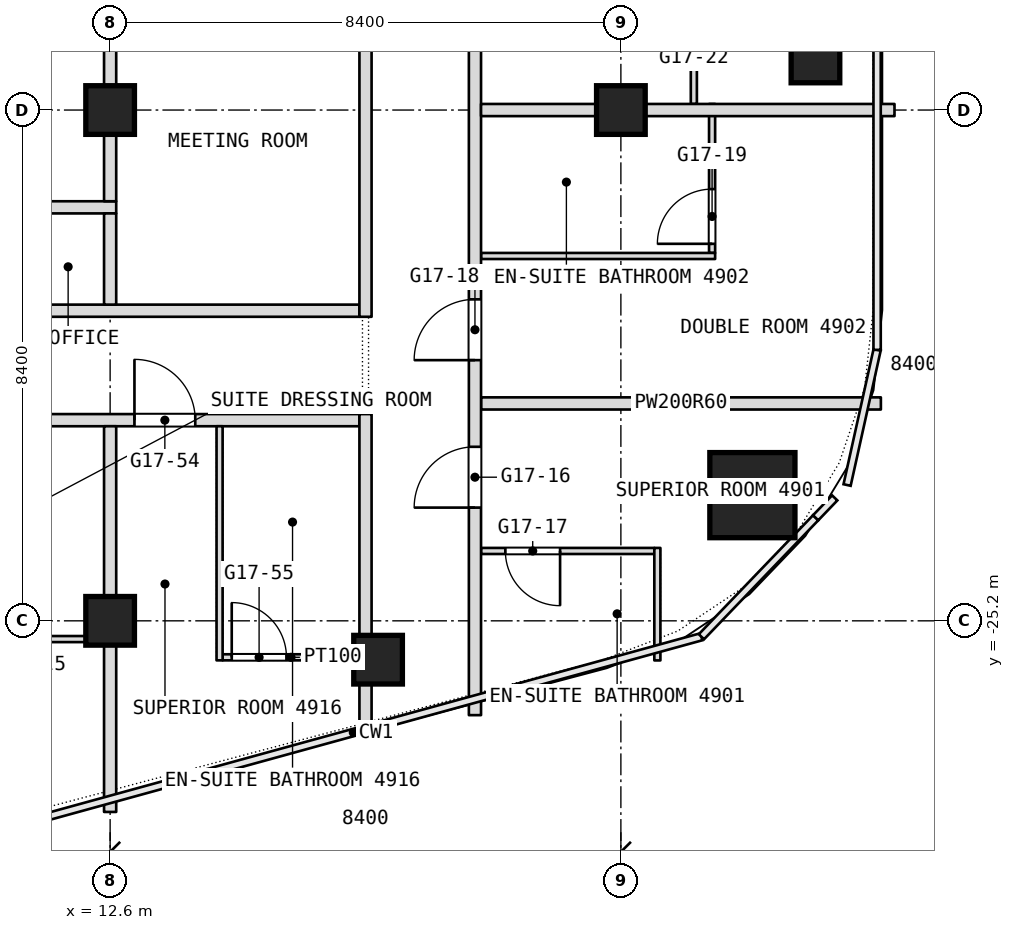
"""IFC4 building model, lengths in metres.
Left out: names, types, materials, properties, quantities, classifications, styles, units other than length and angle.
Written with IfcOpenShell. Run it as: python <this file> out.ifc"""

import sys

from ifc_helpers import new_model, si_unit, direction, frame, frame_2d, origin, origin_2d, place, context, subcontext, project, spatial, rectangle, extrude, element, fill, save


model = new_model("IFC4")
c1 = context("Model", 3, precision=1e-05, world=origin(), true_north=direction((0.0, 1.0)))
c2 = subcontext(c1, "Body", "Model", "MODEL_VIEW")
j1 = project(units=[si_unit("LENGTHUNIT", "METRE"), si_unit("PLANEANGLEUNIT", "RADIAN")], contexts=[c1])
p1 = place(None, origin())
s1 = spatial("IfcSite", under=j1, at=p1, CompositionType="ELEMENT")
p2 = place(p1, origin())
s2 = spatial("IfcBuilding", under=s1, at=p2, CompositionType="ELEMENT")
p3 = place(p2, frame((0.0, 0.0, 212.9)))
s3 = spatial("IfcBuildingStorey", under=s2, at=p3, CompositionType="ELEMENT", Elevation=212.9)
p4 = place(p3, frame((23.163, -23.133, 0.0), z_axis=(0.0, 0.0, 1.0), x_axis=(1.0, 0.0, 0.0)))
e1 = element("IfcColumn", 1, at=p4, inside=s3, PredefinedType="COLUMN", context=c2, shape_type="SweptSolid", body=[
    extrude(rectangle(XDim=1.4, YDim=1.4, at=origin_2d()), origin(), (0.0, 0.0, 1.0), 3.6),
])
for number, where, z_axis, x_axis in (
    (2, (12.6, -25.2, 0.0), (0.0, 0.0, 1.0), (1.0, 0.0, 0.0)),
    (3, (12.6, -16.8, 0.0), (0.0, 0.0, 1.0), (1.0, 0.0, 0.0)),
    (4, (21.0, -16.8, 0.0), (0.0, 0.0, 1.0), (1.0, 0.0, 0.0)),
    (5, (24.2, -15.952, 0.0), (0.0, 0.0, 1.0), (1.0, 0.0, 0.0)),
    (6, (17.007, -25.839, 0.0), (0.0, 0.0, 1.0), (1.0, 0.0, 0.0)),
):
    element("IfcColumn", number, at=place(p3, frame(where, z_axis=z_axis, x_axis=x_axis)), inside=s3, PredefinedType="COLUMN", context=c2, shape_type="SweptSolid", body=[
        extrude(rectangle(XDim=0.8, YDim=0.8, at=origin_2d()), origin(), (0.0, 0.0, 1.0), 3.6),
    ])
p5 = place(p3, frame((14.45, -25.8, 0.0), z_axis=(0.0, 0.0, 1.0), x_axis=(1.0, 0.0, 0.0)))
e7 = element("IfcWall", 7, at=p5, inside=s3, PredefinedType="PARTITIONING", context=c2, shape_type="SweptSolid", body=[
    extrude(rectangle(XDim=2.25, YDim=0.1, at=frame_2d((1.125, 0.0))), origin(), (0.0, 0.0, 1.0), 3.34),
])
p6 = place(p5, frame((0.15, 0.0, 0.0)))
e8 = element("IfcOpeningElement", 8, at=p6, cuts=e7, PredefinedType="OPENING", context=c2, shape_type="SweptSolid", body=[
    extrude(rectangle(XDim=0.9, YDim=2.1, at=frame_2d((0.45, 1.05))), frame((0.0, 0.05, 0.0), z_axis=(0.0, -1.0, 0.0), x_axis=(1.0, 0.0, 0.0)), (0.0, 0.0, 1.0), 0.1),
])
p7 = place(p3, frame((10.25, -25.5, 0.0), z_axis=(0.0, 0.0, 1.0), x_axis=(1.0, 0.0, 0.0)))
e9 = element("IfcWall", 9, at=p7, inside=s3, PredefinedType="PARTITIONING", context=c2, shape_type="SweptSolid", body=[
    extrude(rectangle(XDim=2.45, YDim=0.1, at=frame_2d((1.225, 0.0))), origin(), (0.0, 0.0, 1.0), 3.34),
])
p8 = place(p7, frame((0.15, 0.0, 0.0)))
e10 = element("IfcOpeningElement", 10, at=p8, cuts=e9, PredefinedType="OPENING", context=c2, shape_type="SweptSolid", body=[
    extrude(rectangle(XDim=0.9, YDim=2.1, at=frame_2d((0.45, 1.05))), frame((0.0, 0.05, 0.0), z_axis=(0.0, -1.0, 0.0), x_axis=(1.0, 0.0, 0.0)), (0.0, 0.0, 1.0), 0.1),
])
p9 = place(p3, frame((18.7, -24.051, 0.0), z_axis=(0.0, 0.0, 1.0), x_axis=(1.0, 0.0, 0.0)))
e11 = element("IfcWall", 11, at=p9, inside=s3, PredefinedType="PARTITIONING", context=c2, shape_type="SweptSolid", body=[
    extrude(rectangle(XDim=2.85, YDim=0.1, at=frame_2d((1.425, 0.0))), origin(), (0.0, 0.0, 1.0), 3.34),
])
p10 = place(p9, frame((0.4, 0.0, 0.0)))
e12 = element("IfcOpeningElement", 12, at=p10, cuts=e11, PredefinedType="OPENING", context=c2, shape_type="SweptSolid", body=[
    extrude(rectangle(XDim=0.9, YDim=2.1, at=frame_2d((0.45, 1.05))), frame((0.0, 0.05, 0.0), z_axis=(0.0, -1.0, 0.0), x_axis=(1.0, 0.0, 0.0)), (0.0, 0.0, 1.0), 0.1),
])
p11 = place(p3, frame((22.5, -19.15, 0.0), z_axis=(0.0, 0.0, 1.0), x_axis=(0.0, 1.0, 0.0)))
e13 = element("IfcWall", 13, at=p11, inside=s3, PredefinedType="PARTITIONING", context=c2, shape_type="SweptSolid", body=[
    extrude(rectangle(XDim=2.45, YDim=0.1, at=frame_2d((1.225, 0.0))), origin(), (0.0, 0.0, 1.0), 3.34),
])
p12 = place(p11, frame((0.15, 0.0, 0.0)))
e14 = element("IfcOpeningElement", 14, at=p12, cuts=e13, PredefinedType="OPENING", context=c2, shape_type="SweptSolid", body=[
    extrude(rectangle(XDim=0.9, YDim=2.1, at=frame_2d((0.45, 1.05))), frame((0.0, 0.05, 0.0), z_axis=(0.0, -1.0, 0.0), x_axis=(1.0, 0.0, 0.0)), (0.0, 0.0, 1.0), 0.1),
])
p13 = place(p3, frame((22.2, -16.7, 0.0), z_axis=(0.0, 0.0, 1.0), x_axis=(0.0, 1.0, 0.0)))
e15 = element("IfcWall", 15, at=p13, inside=s3, PredefinedType="PARTITIONING", context=c2, shape_type="SweptSolid", body=[
    extrude(rectangle(XDim=2.35, YDim=0.1, at=frame_2d((1.175, 0.0))), origin(), (0.0, 0.0, 1.0), 3.34),
])
p14 = place(p13, frame((1.3, 0.0, 0.0)))
e16 = element("IfcOpeningElement", 16, at=p14, cuts=e15, PredefinedType="OPENING", context=c2, shape_type="SweptSolid", body=[
    extrude(rectangle(XDim=0.9, YDim=2.1, at=frame_2d((0.45, 1.05))), frame((0.0, 0.05, 0.0), z_axis=(0.0, -1.0, 0.0), x_axis=(1.0, 0.0, 0.0)), (0.0, 0.0, 1.0), 0.1),
])
p15 = place(p3, frame((-16.7, -21.9, 0.0), z_axis=(0.0, 0.0, 1.0), x_axis=(1.0, 0.0, 0.0)))
e17 = element("IfcWall", 17, at=p15, inside=s3, PredefinedType="PARTITIONING", context=c2, shape_type="SweptSolid", body=[
    extrude(rectangle(XDim=33.4, YDim=0.2, at=frame_2d((16.7, 0.0))), origin(), (0.0, 0.0, 1.0), 3.34),
])
p16 = place(p15, frame((0.3, 0.0, 0.0)))
e18 = element("IfcOpeningElement", 18, at=p16, cuts=e17, PredefinedType="OPENING", context=c2, shape_type="SweptSolid", body=[
    extrude(rectangle(XDim=1.0, YDim=2.1, at=frame_2d((0.5, 1.05))), frame((0.0, 0.1, 0.0), z_axis=(0.0, -1.0, 0.0), x_axis=(1.0, 0.0, 0.0)), (0.0, 0.0, 1.0), 0.2),
])
p17 = place(p15, frame((6.9, 0.0, 0.0)))
e19 = element("IfcOpeningElement", 19, at=p17, cuts=e17, PredefinedType="OPENING", context=c2, shape_type="SweptSolid", body=[
    extrude(rectangle(XDim=1.0, YDim=2.1, at=frame_2d((0.5, 1.05))), frame((0.0, 0.1, 0.0), z_axis=(0.0, -1.0, 0.0), x_axis=(1.0, 0.0, 0.0)), (0.0, 0.0, 1.0), 0.2),
])
p18 = place(p15, frame((8.7, 0.0, 0.0)))
e20 = element("IfcOpeningElement", 20, at=p18, cuts=e17, PredefinedType="OPENING", context=c2, shape_type="SweptSolid", body=[
    extrude(rectangle(XDim=1.0, YDim=2.1, at=frame_2d((0.5, 1.05))), frame((0.0, 0.1, 0.0), z_axis=(0.0, -1.0, 0.0), x_axis=(1.0, 0.0, 0.0)), (0.0, 0.0, 1.0), 0.2),
])
p19 = place(p15, frame((12.9, 0.0, 0.0)))
e21 = element("IfcOpeningElement", 21, at=p19, cuts=e17, PredefinedType="OPENING", context=c2, shape_type="SweptSolid", body=[
    extrude(rectangle(XDim=1.0, YDim=2.1, at=frame_2d((0.5, 1.05))), frame((0.0, 0.1, 0.0), z_axis=(0.0, -1.0, 0.0), x_axis=(1.0, 0.0, 0.0)), (0.0, 0.0, 1.0), 0.2),
])
p20 = place(p15, frame((19.5, 0.0, 0.0)))
e22 = element("IfcOpeningElement", 22, at=p20, cuts=e17, PredefinedType="OPENING", context=c2, shape_type="SweptSolid", body=[
    extrude(rectangle(XDim=1.0, YDim=2.1, at=frame_2d((0.5, 1.05))), frame((0.0, 0.1, 0.0), z_axis=(0.0, -1.0, 0.0), x_axis=(1.0, 0.0, 0.0)), (0.0, 0.0, 1.0), 0.2),
])
p21 = place(p15, frame((24.6, 0.0, 0.0)))
e23 = element("IfcOpeningElement", 23, at=p21, cuts=e17, PredefinedType="OPENING", context=c2, shape_type="SweptSolid", body=[
    extrude(rectangle(XDim=1.1, YDim=2.1, at=frame_2d((0.55, 1.05))), frame((0.0, 0.1, 0.0), z_axis=(0.0, -1.0, 0.0), x_axis=(1.0, 0.0, 0.0)), (0.0, 0.0, 1.0), 0.2),
])
p22 = place(p15, frame((29.7, 0.0, 0.0)))
e24 = element("IfcOpeningElement", 24, at=p22, cuts=e17, PredefinedType="OPENING", context=c2, shape_type="SweptSolid", body=[
    extrude(rectangle(XDim=1.0, YDim=2.1, at=frame_2d((0.5, 1.05))), frame((0.0, 0.1, 0.0), z_axis=(0.0, -1.0, 0.0), x_axis=(1.0, 0.0, 0.0)), (0.0, 0.0, 1.0), 0.2),
])
p23 = place(p3, frame((18.7, -21.625, 0.0), z_axis=(0.0, 0.0, 1.0), x_axis=(1.0, 0.0, 0.0)))
e25 = element("IfcWall", 25, at=p23, inside=s3, PredefinedType="PARTITIONING", context=c2, shape_type="SweptSolid", body=[
    extrude(rectangle(XDim=6.576, YDim=0.2, at=frame_2d((3.288, 0.0))), origin(), (0.0, 0.0, 1.0), 3.34),
])
p24 = place(p3, frame((21.6, -25.851, 0.0), z_axis=(0.0, 0.0, 1.0), x_axis=(0.0, 1.0, 0.0)))
e26 = element("IfcWall", 26, at=p24, inside=s3, PredefinedType="PARTITIONING", context=c2, shape_type="SweptSolid", body=[
    extrude(rectangle(XDim=1.85, YDim=0.1, at=frame_2d((0.925, 0.0))), origin(), (0.0, 0.0, 1.0), 3.34),
])
p25 = place(p3, frame((-4.1, -20.1, 0.0), z_axis=(0.0, 0.0, 1.0), x_axis=(1.0, 0.0, 0.0)))
e27 = element("IfcWall", 27, at=p25, inside=s3, PredefinedType="PARTITIONING", context=c2, shape_type="SweptSolid", body=[
    extrude(rectangle(XDim=20.8, YDim=0.2, at=frame_2d((10.4, 0.0))), origin(), (0.0, 0.0, 1.0), 3.34),
])
p26 = place(p3, frame((18.7, -19.2, 0.0), z_axis=(0.0, 0.0, 1.0), x_axis=(1.0, 0.0, 0.0)))
e28 = element("IfcWall", 28, at=p26, inside=s3, PredefinedType="PARTITIONING", context=c2, shape_type="SweptSolid", body=[
    extrude(rectangle(XDim=3.85, YDim=0.1, at=frame_2d((1.925, 0.0))), origin(), (0.0, 0.0, 1.0), 3.34),
])
p27 = place(p3, frame((18.6, -26.751, 0.0), z_axis=(0.0, 0.0, 1.0), x_axis=(0.0, 1.0, 0.0)))
e29 = element("IfcWall", 29, at=p27, inside=s3, PredefinedType="PARTITIONING", context=c2, shape_type="SweptSolid", body=[
    extrude(rectangle(XDim=49.091, YDim=0.2, at=frame_2d((24.545, 0.0))), origin(), (0.0, 0.0, 1.0), 3.34),
])
p28 = place(p27, frame((3.413, 0.0, 0.0)))
e30 = element("IfcOpeningElement", 30, at=p28, cuts=e29, PredefinedType="OPENING", context=c2, shape_type="SweptSolid", body=[
    extrude(rectangle(XDim=1.0, YDim=2.1, at=frame_2d((0.5, 1.05))), frame((0.0, 0.1, 0.0), z_axis=(0.0, -1.0, 0.0), x_axis=(1.0, 0.0, 0.0)), (0.0, 0.0, 1.0), 0.2),
])
p29 = place(p27, frame((5.838, 0.0, 0.0)))
e31 = element("IfcOpeningElement", 31, at=p29, cuts=e29, PredefinedType="OPENING", context=c2, shape_type="SweptSolid", body=[
    extrude(rectangle(XDim=1.0, YDim=2.1, at=frame_2d((0.5, 1.05))), frame((0.0, 0.1, 0.0), z_axis=(0.0, -1.0, 0.0), x_axis=(1.0, 0.0, 0.0)), (0.0, 0.0, 1.0), 0.2),
])
p30 = place(p27, frame((13.551, 0.0, 0.0)))
e32 = element("IfcOpeningElement", 32, at=p30, cuts=e29, PredefinedType="OPENING", context=c2, shape_type="SweptSolid", body=[
    extrude(rectangle(XDim=1.1, YDim=2.1, at=frame_2d((0.55, 1.05))), frame((0.0, 0.1, 0.0), z_axis=(0.0, -1.0, 0.0), x_axis=(1.0, 0.0, 0.0)), (0.0, 0.0, 1.0), 0.2),
])
p31 = place(p27, frame((21.151, 0.0, 0.0)))
e33 = element("IfcOpeningElement", 33, at=p31, cuts=e29, PredefinedType="OPENING", context=c2, shape_type="SweptSolid", body=[
    extrude(rectangle(XDim=1.0, YDim=2.1, at=frame_2d((0.5, 1.05))), frame((0.0, 0.1, 0.0), z_axis=(0.0, -1.0, 0.0), x_axis=(1.0, 0.0, 0.0)), (0.0, 0.0, 1.0), 0.2),
])
p32 = place(p27, frame((22.951, 0.0, 0.0)))
e34 = element("IfcOpeningElement", 34, at=p32, cuts=e29, PredefinedType="OPENING", context=c2, shape_type="SweptSolid", body=[
    extrude(rectangle(XDim=1.0, YDim=2.1, at=frame_2d((0.5, 1.05))), frame((0.0, 0.1, 0.0), z_axis=(0.0, -1.0, 0.0), x_axis=(1.0, 0.0, 0.0)), (0.0, 0.0, 1.0), 0.2),
])
p33 = place(p27, frame((30.351, 0.0, 0.0)))
e35 = element("IfcOpeningElement", 35, at=p33, cuts=e29, PredefinedType="OPENING", context=c2, shape_type="SweptSolid", body=[
    extrude(rectangle(XDim=1.1, YDim=2.1, at=frame_2d((0.55, 1.05))), frame((0.0, 0.1, 0.0), z_axis=(0.0, -1.0, 0.0), x_axis=(1.0, 0.0, 0.0)), (0.0, 0.0, 1.0), 0.2),
])
p34 = place(p27, frame((37.951, 0.0, 0.0)))
e36 = element("IfcOpeningElement", 36, at=p34, cuts=e29, PredefinedType="OPENING", context=c2, shape_type="SweptSolid", body=[
    extrude(rectangle(XDim=1.0, YDim=2.1, at=frame_2d((0.5, 1.05))), frame((0.0, 0.1, 0.0), z_axis=(0.0, -1.0, 0.0), x_axis=(1.0, 0.0, 0.0)), (0.0, 0.0, 1.0), 0.2),
])
p35 = place(p27, frame((39.751, 0.0, 0.0)))
e37 = element("IfcOpeningElement", 37, at=p35, cuts=e29, PredefinedType="OPENING", context=c2, shape_type="SweptSolid", body=[
    extrude(rectangle(XDim=1.0, YDim=2.1, at=frame_2d((0.5, 1.05))), frame((0.0, 0.1, 0.0), z_axis=(0.0, -1.0, 0.0), x_axis=(1.0, 0.0, 0.0)), (0.0, 0.0, 1.0), 0.2),
])
p36 = place(p27, frame((44.051, 0.0, 0.0)))
e38 = element("IfcOpeningElement", 38, at=p36, cuts=e29, PredefinedType="OPENING", context=c2, shape_type="SweptSolid", body=[
    extrude(rectangle(XDim=1.0, YDim=2.1, at=frame_2d((0.5, 1.05))), frame((0.0, 0.1, 0.0), z_axis=(0.0, -1.0, 0.0), x_axis=(1.0, 0.0, 0.0)), (0.0, 0.0, 1.0), 0.2),
])
p37 = place(p3, frame((5.7, -18.4, 0.0), z_axis=(0.0, 0.0, 1.0), x_axis=(1.0, 0.0, 0.0)))
e39 = element("IfcWall", 39, at=p37, inside=s3, PredefinedType="PARTITIONING", context=c2, shape_type="SweptSolid", body=[
    extrude(rectangle(XDim=7.0, YDim=0.2, at=frame_2d((3.5, 0.0))), origin(), (0.0, 0.0, 1.0), 3.34),
])
p38 = place(p37, frame((4.3, 0.0, 0.0)))
e40 = element("IfcOpeningElement", 40, at=p38, cuts=e39, PredefinedType="OPENING", context=c2, shape_type="SweptSolid", body=[
    extrude(rectangle(XDim=1.0, YDim=2.1, at=frame_2d((0.5, 1.05))), frame((0.0, 0.1, 0.0), z_axis=(0.0, -1.0, 0.0), x_axis=(1.0, 0.0, 0.0)), (0.0, 0.0, 1.0), 0.2),
])
p39 = place(p3, frame((16.8, -27.229, 0.0), z_axis=(0.0, 0.0, 1.0), x_axis=(0.0, 1.0, 0.0)))
e41 = element("IfcWall", 41, at=p39, inside=s3, PredefinedType="PARTITIONING", context=c2, shape_type="SweptSolid", body=[
    extrude(rectangle(XDim=5.429, YDim=0.2, at=frame_2d((2.714, 0.0))), origin(), (0.0, 0.0, 1.0), 3.34),
])
p40 = place(p3, frame((16.8, -20.2, 0.0), z_axis=(0.0, 0.0, 1.0), x_axis=(0.0, 1.0, 0.0)))
e42 = element("IfcWall", 42, at=p40, inside=s3, PredefinedType="PARTITIONING", context=c2, shape_type="SweptSolid", body=[
    extrude(rectangle(XDim=6.8, YDim=0.2, at=frame_2d((3.4, 0.0))), origin(), (0.0, 0.0, 1.0), 3.34),
])
p41 = place(p3, frame((18.7, -16.8, 0.0), z_axis=(0.0, 0.0, 1.0), x_axis=(1.0, 0.0, 0.0)))
e43 = element("IfcWall", 43, at=p41, inside=s3, PredefinedType="PARTITIONING", context=c2, shape_type="SweptSolid", body=[
    extrude(rectangle(XDim=6.8, YDim=0.2, at=frame_2d((3.4, 0.0))), origin(), (0.0, 0.0, 1.0), 2.94),
])
p42 = place(p3, frame((14.4, -25.85, 0.0), z_axis=(0.0, 0.0, 1.0), x_axis=(0.0, 1.0, 0.0)))
e44 = element("IfcWall", 44, at=p42, inside=s3, PredefinedType="PARTITIONING", context=c2, shape_type="SweptSolid", body=[
    extrude(rectangle(XDim=3.85, YDim=0.1, at=frame_2d((1.925, 0.0))), origin(), (0.0, 0.0, 1.0), 3.34),
])
p43 = place(p3, frame((12.6, -28.343, 0.0), z_axis=(0.0, 0.0, 1.0), x_axis=(0.0, 1.0, 0.0)))
e45 = element("IfcWall", 45, at=p43, inside=s3, PredefinedType="PARTITIONING", context=c2, shape_type="SweptSolid", body=[
    extrude(rectangle(XDim=6.343, YDim=0.2, at=frame_2d((3.171, 0.0))), origin(), (0.0, 0.0, 1.0), 3.34),
])
p44 = place(p3, frame((12.6, -20.0, 0.0), z_axis=(0.0, 0.0, 1.0), x_axis=(0.0, 1.0, 0.0)))
e46 = element("IfcWall", 46, at=p44, inside=s3, PredefinedType="PARTITIONING", context=c2, shape_type="SweptSolid", body=[
    extrude(rectangle(XDim=1.5, YDim=0.2, at=frame_2d((0.75, 0.0))), origin(), (0.0, 0.0, 1.0), 3.34),
])
p45 = place(p3, frame((12.6, -18.3, 0.0), z_axis=(0.0, 0.0, 1.0), x_axis=(0.0, 1.0, 0.0)))
e47 = element("IfcWall", 47, at=p45, inside=s3, PredefinedType="PARTITIONING", context=c2, shape_type="SweptSolid", body=[
    extrude(rectangle(XDim=4.7, YDim=0.2, at=frame_2d((2.35, 0.0))), origin(), (0.0, 0.0, 1.0), 3.34),
])
p46 = place(p6, origin())
e48 = element("IfcDoor", 48, at=p46, inside=s3, OperationType="SINGLE_SWING_LEFT", PredefinedType="DOOR", context=c2, shape_type="SweptSolid", body=[
    extrude(rectangle(XDim=0.9, YDim=2.1, at=frame_2d((0.45, 1.05))), frame((0.0, 0.025, 0.0), z_axis=(0.0, -1.0, 0.0), x_axis=(1.0, 0.0, 0.0)), (0.0, 0.0, 1.0), 0.05),
])
fill(e8, e48)
p47 = place(p10, origin())
e49 = element("IfcDoor", 49, at=p47, inside=s3, OperationType="SINGLE_SWING_RIGHT", PredefinedType="DOOR", context=c2, shape_type="SweptSolid", body=[
    extrude(rectangle(XDim=0.9, YDim=2.1, at=frame_2d((0.45, 1.05))), frame((0.0, 0.025, 0.0), z_axis=(0.0, -1.0, 0.0), x_axis=(1.0, 0.0, 0.0)), (0.0, 0.0, 1.0), 0.05),
])
fill(e12, e49)
p48 = place(p12, origin())
e50 = element("IfcDoor", 50, at=p48, inside=s3, OperationType="SINGLE_SWING_LEFT", PredefinedType="DOOR", context=c2, shape_type="SweptSolid", body=[
    extrude(rectangle(XDim=0.9, YDim=2.1, at=frame_2d((0.45, 1.05))), frame((0.0, 0.025, 0.0), z_axis=(0.0, -1.0, 0.0), x_axis=(1.0, 0.0, 0.0)), (0.0, 0.0, 1.0), 0.05),
])
fill(e14, e50)
p49 = place(p22, origin())
e51 = element("IfcDoor", 51, at=p49, inside=s3, OperationType="SINGLE_SWING_RIGHT", PredefinedType="DOOR", context=c2, shape_type="SweptSolid", body=[
    extrude(rectangle(XDim=1.0, YDim=2.1, at=frame_2d((0.5, 1.05))), frame((0.0, 0.025, 0.0), z_axis=(0.0, -1.0, 0.0), x_axis=(1.0, 0.0, 0.0)), (0.0, 0.0, 1.0), 0.05),
])
fill(e24, e51)
p50 = place(p28, origin())
e52 = element("IfcDoor", 52, at=p50, inside=s3, OperationType="SINGLE_SWING_RIGHT", PredefinedType="DOOR", context=c2, shape_type="SweptSolid", body=[
    extrude(rectangle(XDim=1.0, YDim=2.1, at=frame_2d((0.5, 1.05))), frame((0.0, 0.025, 0.0), z_axis=(0.0, -1.0, 0.0), x_axis=(1.0, 0.0, 0.0)), (0.0, 0.0, 1.0), 0.05),
])
fill(e30, e52)
p51 = place(p29, origin())
e53 = element("IfcDoor", 53, at=p51, inside=s3, OperationType="SINGLE_SWING_RIGHT", PredefinedType="DOOR", context=c2, shape_type="SweptSolid", body=[
    extrude(rectangle(XDim=1.0, YDim=2.1, at=frame_2d((0.5, 1.05))), frame((0.0, 0.025, 0.0), z_axis=(0.0, -1.0, 0.0), x_axis=(1.0, 0.0, 0.0)), (0.0, 0.0, 1.0), 0.05),
])
fill(e31, e53)
save(model, sys.argv[1])
